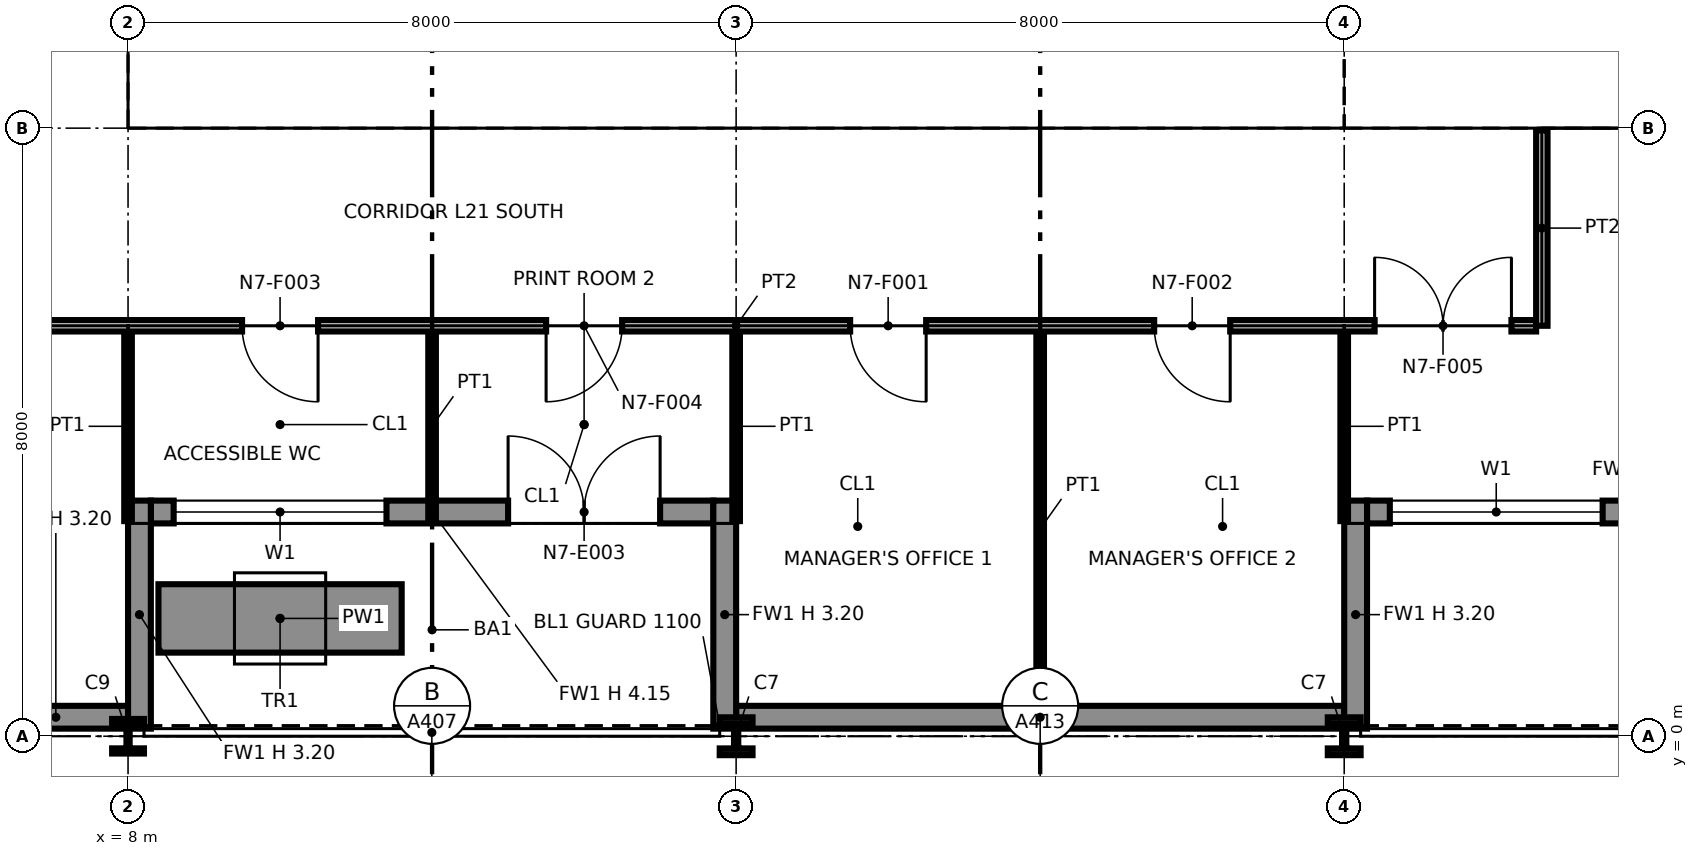
"""IFC4 building model, lengths in metres.
Left out: names, types, materials, properties, quantities, classifications, styles, units other than length and angle.
Written with IfcOpenShell. Run it as: python <this file> out.ifc"""

import sys

from ifc_helpers import new_model, si_unit, direction, frame, frame_2d, origin, origin_2d, place, context, subcontext, project, spatial, polyline, rectangle, i_section, outline, extrude, element, fill, save


model = new_model("IFC4")
c1 = context("Model", 3, precision=1e-05, world=origin(), true_north=direction((0.0, 1.0)))
c2 = subcontext(c1, "Body", "Model", "MODEL_VIEW")
j1 = project(units=[si_unit("LENGTHUNIT", "METRE"), si_unit("PLANEANGLEUNIT", "RADIAN")], contexts=[c1])
p1 = place(None, origin())
s1 = spatial("IfcSite", under=j1, at=p1, CompositionType="ELEMENT")
p2 = place(p1, origin())
s2 = spatial("IfcBuilding", under=s1, at=p2, CompositionType="ELEMENT")
p3 = place(p2, frame((0.0, 0.0, 109.6)))
s3 = spatial("IfcBuildingStorey", under=s2, at=p3, CompositionType="ELEMENT", Elevation=109.6)
p4 = place(p3, frame((8.0, 0.0, 0.0), z_axis=(0.0, 0.0, 1.0), x_axis=(1.0, 0.0, 0.0)))
e1 = element("IfcColumn", 1, at=p4, inside=s3, PredefinedType="COLUMN", context=c2, shape_type="SweptSolid", body=[
    extrude(i_section(OverallWidth=0.419, OverallDepth=0.455, WebThickness=0.042, FlangeThickness=0.068, at=origin_2d()), origin(), (0.0, 0.0, 1.0), 4.15),
])
p5 = place(p3, frame((8.0, 8.0, 0.0), z_axis=(0.0, 0.0, 1.0), x_axis=(1.0, 0.0, 0.0)))
e2 = element("IfcColumn", 2, at=p5, inside=s3, PredefinedType="COLUMN", context=c2, shape_type="SweptSolid", body=[
    extrude(i_section(OverallWidth=0.406, OverallDepth=0.417, WebThickness=0.03, FlangeThickness=0.048, at=origin_2d()), origin(), (0.0, 0.0, 1.0), 4.15),
])
p6 = place(p3, frame((16.0, 0.0, 0.0), z_axis=(0.0, 0.0, 1.0), x_axis=(1.0, 0.0, 0.0)))
e3 = element("IfcColumn", 3, at=p6, inside=s3, PredefinedType="COLUMN", context=c2, shape_type="SweptSolid", body=[
    extrude(i_section(OverallWidth=0.432, OverallDepth=0.498, WebThickness=0.056, FlangeThickness=0.089, at=origin_2d()), origin(), (0.0, 0.0, 1.0), 4.15),
])
p7 = place(p3, frame((16.0, 8.0, 0.0), z_axis=(0.0, 0.0, 1.0), x_axis=(1.0, 0.0, 0.0)))
e4 = element("IfcColumn", 4, at=p7, inside=s3, PredefinedType="COLUMN", context=c2, shape_type="SweptSolid", body=[
    extrude(i_section(OverallWidth=0.406, OverallDepth=0.417, WebThickness=0.03, FlangeThickness=0.048, at=origin_2d()), origin(), (0.0, 0.0, 1.0), 4.15),
])
p8 = place(p3, frame((24.0, 0.0, 0.0), z_axis=(0.0, 0.0, 1.0), x_axis=(1.0, 0.0, 0.0)))
e5 = element("IfcColumn", 5, at=p8, inside=s3, PredefinedType="COLUMN", context=c2, shape_type="SweptSolid", body=[
    extrude(i_section(OverallWidth=0.432, OverallDepth=0.498, WebThickness=0.056, FlangeThickness=0.089, at=origin_2d()), origin(), (0.0, 0.0, 1.0), 4.15),
])
p9 = place(p3, frame((24.0, 8.0, 0.0), z_axis=(0.0, 0.0, 1.0), x_axis=(1.0, 0.0, 0.0)))
e6 = element("IfcColumn", 6, at=p9, inside=s3, PredefinedType="COLUMN", context=c2, shape_type="SweptSolid", body=[
    extrude(i_section(OverallWidth=0.411, OverallDepth=0.434, WebThickness=0.036, FlangeThickness=0.057, at=origin_2d()), origin(), (0.0, 0.0, 1.0), 4.15),
])
p10 = place(p3, frame((6.1, 0.25, 0.0), z_axis=(0.0, 0.0, 1.0), x_axis=(1.0, 0.0, 0.0)))
e7 = element("IfcWall", 7, at=p10, inside=s3, PredefinedType="SOLIDWALL", context=c2, shape_type="SweptSolid", body=[
    extrude(rectangle(XDim=1.9, YDim=0.3, at=frame_2d((0.95, 0.0))), origin(), (0.0, 0.0, 1.0), 3.199),
])
p11 = place(p3, frame((8.3, 2.95, 0.0), z_axis=(0.0, 0.0, 1.0), x_axis=(1.0, 0.0, 0.0)))
e8 = element("IfcWall", 8, at=p11, inside=s3, PredefinedType="SOLIDWALL", context=c2, shape_type="SweptSolid", body=[
    extrude(rectangle(XDim=7.4, YDim=0.3, at=frame_2d((3.7, 0.0))), origin(), (0.0, 0.0, 1.0), 4.15),
])
p12 = place(p11, frame((0.3, 0.0, 0.9)))
e9 = element("IfcOpeningElement", 9, at=p12, cuts=e8, PredefinedType="OPENING", context=c2, shape_type="SweptSolid", body=[
    extrude(rectangle(XDim=2.8, YDim=2.2, at=frame_2d((1.4, 1.1))), frame((0.0, 0.16, 0.0), z_axis=(0.0, -1.0, 0.0), x_axis=(1.0, 0.0, 0.0)), (0.0, 0.0, 1.0), 0.32),
])
p13 = place(p11, frame((4.7, 0.0, 0.0)))
e10 = element("IfcOpeningElement", 10, at=p13, cuts=e8, PredefinedType="OPENING", context=c2, shape_type="SweptSolid", body=[
    extrude(rectangle(XDim=2.0, YDim=2.4, at=frame_2d((1.0, 1.2))), frame((0.0, 0.16, 0.0), z_axis=(0.0, -1.0, 0.0), x_axis=(1.0, 0.0, 0.0)), (0.0, 0.0, 1.0), 0.32),
])
for number, where, z_axis, x_axis in (
    (11, (8.15, 0.1, 0.0), (0.0, 0.0, 1.0), (0.0, 1.0, 0.0)),
    (12, (15.85, 0.1, 0.0), (0.0, 0.0, 1.0), (0.0, 1.0, 0.0)),
):
    element("IfcWall", number, at=place(p3, frame(where, z_axis=z_axis, x_axis=x_axis)), inside=s3, PredefinedType="SOLIDWALL", context=c2, shape_type="SweptSolid", body=[
        extrude(rectangle(XDim=3.0, YDim=0.3, at=frame_2d((1.5, 0.0))), origin(), (0.0, 0.0, 1.0), 3.199),
    ])
p14 = place(p3, frame((16.0, 0.25, 0.0), z_axis=(0.0, 0.0, 1.0), x_axis=(1.0, 0.0, 0.0)))
e13 = element("IfcWall", 13, at=p14, inside=s3, PredefinedType="SOLIDWALL", context=c2, shape_type="SweptSolid", body=[
    extrude(rectangle(XDim=8.0, YDim=0.3, at=frame_2d((4.0, 0.0))), origin(), (0.0, 0.0, 1.0), 3.199),
])
p15 = place(p3, frame((24.3, 2.95, 0.0), z_axis=(0.0, 0.0, 1.0), x_axis=(1.0, 0.0, 0.0)))
e14 = element("IfcWall", 14, at=p15, inside=s3, PredefinedType="SOLIDWALL", context=c2, shape_type="SweptSolid", body=[
    extrude(rectangle(XDim=7.4, YDim=0.3, at=frame_2d((3.7, 0.0))), origin(), (0.0, 0.0, 1.0), 4.15),
])
p16 = place(p15, frame((0.3, 0.0, 0.9)))
e15 = element("IfcOpeningElement", 15, at=p16, cuts=e14, PredefinedType="OPENING", context=c2, shape_type="SweptSolid", body=[
    extrude(rectangle(XDim=2.8, YDim=2.2, at=frame_2d((1.4, 1.1))), frame((0.0, 0.16, 0.0), z_axis=(0.0, -1.0, 0.0), x_axis=(1.0, 0.0, 0.0)), (0.0, 0.0, 1.0), 0.32),
])
p17 = place(p15, frame((4.7, 0.0, 0.0)))
e16 = element("IfcOpeningElement", 16, at=p17, cuts=e14, PredefinedType="OPENING", context=c2, shape_type="SweptSolid", body=[
    extrude(rectangle(XDim=2.0, YDim=2.4, at=frame_2d((1.0, 1.2))), frame((0.0, 0.16, 0.0), z_axis=(0.0, -1.0, 0.0), x_axis=(1.0, 0.0, 0.0)), (0.0, 0.0, 1.0), 0.32),
])
p18 = place(p3, frame((24.15, 0.1, 0.0), z_axis=(0.0, 0.0, 1.0), x_axis=(0.0, 1.0, 0.0)))
e17 = element("IfcWall", 17, at=p18, inside=s3, PredefinedType="SOLIDWALL", context=c2, shape_type="SweptSolid", body=[
    extrude(rectangle(XDim=3.0, YDim=0.3, at=frame_2d((1.5, 0.0))), origin(), (0.0, 0.0, 1.0), 3.199),
])
p19 = place(p3, frame((8.4, 1.55, 0.0), z_axis=(0.0, 0.0, 1.0), x_axis=(1.0, 0.0, 0.0)))
e18 = element("IfcWall", 18, at=p19, inside=s3, PredefinedType="SOLIDWALL", context=c2, shape_type="SweptSolid", body=[
    extrude(rectangle(XDim=3.2, YDim=0.9, at=frame_2d((1.6, 0.0))), origin(), (0.0, 0.0, 1.0), 0.6),
])
p20 = place(p3, frame((8.65, 8.75, 0.0), z_axis=(0.0, 0.0, 1.0), x_axis=(1.0, 0.0, 0.0)))
e19 = element("IfcWall", 19, at=p20, inside=s3, PredefinedType="PARTITIONING", context=c2, shape_type="SweptSolid", body=[
    extrude(outline(polyline([(0.0, 0.0), (14.7, 0.0), (14.7, 4.15), (7.489, 4.15), (7.488, 3.382), (7.212, 3.382), (7.211, 4.15), (0.0, 4.15), (0.0, 0.0)])), frame((0.0, 0.1, 0.0), z_axis=(0.0, -1.0, 0.0), x_axis=(1.0, 0.0, 0.0)), (0.0, 0.0, 1.0), 0.2),
])
p21 = place(p20, frame((1.3, 0.0, 0.0)))
e20 = element("IfcOpeningElement", 20, at=p21, cuts=e19, PredefinedType="OPENING", context=c2, shape_type="SweptSolid", body=[
    extrude(rectangle(XDim=1.4, YDim=2.1, at=frame_2d((0.7, 1.05))), frame((0.0, 0.11, 0.0), z_axis=(0.0, -1.0, 0.0), x_axis=(1.0, 0.0, 0.0)), (0.0, 0.0, 1.0), 0.22),
])
p22 = place(p20, frame((4.6, 0.0, 0.0)))
e21 = element("IfcOpeningElement", 21, at=p22, cuts=e19, PredefinedType="OPENING", context=c2, shape_type="SweptSolid", body=[
    extrude(rectangle(XDim=1.4, YDim=2.1, at=frame_2d((0.7, 1.05))), frame((0.0, 0.11, 0.0), z_axis=(0.0, -1.0, 0.0), x_axis=(1.0, 0.0, 0.0)), (0.0, 0.0, 1.0), 0.22),
])
p23 = place(p20, frame((10.4, 0.0, 0.0)))
e22 = element("IfcOpeningElement", 22, at=p23, cuts=e19, PredefinedType="OPENING", context=c2, shape_type="SweptSolid", body=[
    extrude(rectangle(XDim=1.2, YDim=2.1, at=frame_2d((0.6, 1.05))), frame((0.0, 0.11, 0.0), z_axis=(0.0, -1.0, 0.0), x_axis=(1.0, 0.0, 0.0)), (0.0, 0.0, 1.0), 0.22),
])
p24 = place(p3, frame((8.75, 8.85, 0.0), z_axis=(0.0, 0.0, 1.0), x_axis=(0.0, 1.0, 0.0)))
e23 = element("IfcWall", 23, at=p24, inside=s3, PredefinedType="PARTITIONING", context=c2, shape_type="SweptSolid", body=[
    extrude(outline(polyline([(0.0, 0.0), (14.3, 0.0), (14.3, 4.15), (10.269, 4.15), (10.268, 3.542), (10.032, 3.542), (10.031, 4.15), (7.289, 4.15), (7.288, 3.382), (7.012, 3.382), (7.011, 4.15), (0.0, 4.15), (0.0, 0.0)])), frame((0.0, 0.1, 0.0), z_axis=(0.0, -1.0, 0.0), x_axis=(1.0, 0.0, 0.0)), (0.0, 0.0, 1.0), 0.2),
])
p25 = place(p24, frame((8.3, 0.0, 0.0)))
e24 = element("IfcOpeningElement", 24, at=p25, cuts=e23, PredefinedType="OPENING", context=c2, shape_type="SweptSolid", body=[
    extrude(rectangle(XDim=1.8, YDim=2.1, at=frame_2d((0.9, 1.05))), frame((0.0, 0.11, 0.0), z_axis=(0.0, -1.0, 0.0), x_axis=(1.0, 0.0, 0.0)), (0.0, 0.0, 1.0), 0.22),
])
p26 = place(p3, frame((12.4, 8.85, 0.0), z_axis=(0.0, 0.0, 1.0), x_axis=(0.0, 1.0, 0.0)))
e25 = element("IfcWall", 25, at=p26, inside=s3, PredefinedType="PARTITIONING", context=c2, shape_type="SweptSolid", body=[
    extrude(rectangle(XDim=6.85, YDim=0.2, at=frame_2d((3.425, 0.0))), origin(), (0.0, 0.0, 1.0), 4.15),
])
p27 = place(p3, frame((15.85, 8.85, 0.0), z_axis=(0.0, 0.0, 1.0), x_axis=(0.0, 1.0, 0.0)))
e26 = element("IfcWall", 26, at=p27, inside=s3, PredefinedType="PARTITIONING", context=c2, shape_type="SweptSolid", body=[
    extrude(rectangle(XDim=1.55, YDim=0.9, at=frame_2d((0.775, 0.0))), origin(), (0.0, 0.0, 1.0), 3.382),
])
p28 = place(p27, frame((0.3, 0.0, 0.0)))
e27 = element("IfcOpeningElement", 27, at=p28, cuts=e26, PredefinedType="OPENING", context=c2, shape_type="SweptSolid", body=[
    extrude(rectangle(XDim=1.1, YDim=2.1, at=frame_2d((0.55, 1.05))), frame((0.0, 0.46, 0.0), z_axis=(0.0, -1.0, 0.0), x_axis=(1.0, 0.0, 0.0)), (0.0, 0.0, 1.0), 0.92),
])
p29 = place(p3, frame((23.25, 8.85, 0.0), z_axis=(0.0, 0.0, 1.0), x_axis=(0.0, 1.0, 0.0)))
e28 = element("IfcWall", 28, at=p29, inside=s3, PredefinedType="PARTITIONING", context=c2, shape_type="SweptSolid", body=[
    extrude(outline(polyline([(0.0, 0.0), (14.3, 0.0), (14.3, 4.15), (11.269, 4.15), (11.268, 3.542), (11.032, 3.542), (11.031, 4.15), (7.289, 4.15), (7.288, 3.382), (7.012, 3.382), (7.011, 4.15), (1.269, 4.15), (1.268, 3.542), (1.032, 3.542), (1.031, 4.15), (0.0, 4.15), (0.0, 0.0)])), frame((0.0, 0.1, 0.0), z_axis=(0.0, -1.0, 0.0), x_axis=(1.0, 0.0, 0.0)), (0.0, 0.0, 1.0), 0.2),
])
p30 = place(p29, frame((8.3, 0.0, 0.0)))
e29 = element("IfcOpeningElement", 29, at=p30, cuts=e28, PredefinedType="OPENING", context=c2, shape_type="SweptSolid", body=[
    extrude(rectangle(XDim=1.8, YDim=2.1, at=frame_2d((0.9, 1.05))), frame((0.0, 0.11, 0.0), z_axis=(0.0, -1.0, 0.0), x_axis=(1.0, 0.0, 0.0)), (0.0, 0.0, 1.0), 0.22),
])
p31 = place(p3, frame((24.65, 8.75, 0.0), z_axis=(0.0, 0.0, 1.0), x_axis=(1.0, 0.0, 0.0)))
e30 = element("IfcWall", 30, at=p31, inside=s3, PredefinedType="PARTITIONING", context=c2, shape_type="SweptSolid", body=[
    extrude(outline(polyline([(0.0, 0.0), (14.7, 0.0), (14.7, 4.15), (7.489, 4.15), (7.488, 3.382), (7.212, 3.382), (7.211, 4.15), (0.0, 4.15), (0.0, 0.0)])), frame((0.0, 0.1, 0.0), z_axis=(0.0, -1.0, 0.0), x_axis=(1.0, 0.0, 0.0)), (0.0, 0.0, 1.0), 0.2),
])
p32 = place(p3, frame((24.75, 8.85, 0.0), z_axis=(0.0, 0.0, 1.0), x_axis=(0.0, 1.0, 0.0)))
e31 = element("IfcWall", 31, at=p32, inside=s3, PredefinedType="PARTITIONING", context=c2, shape_type="SweptSolid", body=[
    extrude(outline(polyline([(0.0, 0.0), (6.3, 0.0), (6.3, 4.15), (3.269, 4.15), (3.268, 3.542), (3.032, 3.542), (3.031, 4.15), (0.0, 4.15), (0.0, 0.0)])), frame((0.0, 0.1, 0.0), z_axis=(0.0, -1.0, 0.0), x_axis=(1.0, 0.0, 0.0)), (0.0, 0.0, 1.0), 0.2),
])
p33 = place(p3, frame((27.075, 8.85, 0.0), z_axis=(0.0, 0.0, 1.0), x_axis=(0.0, 1.0, 0.0)))
e32 = element("IfcWall", 32, at=p33, inside=s3, PredefinedType="PARTITIONING", context=c2, shape_type="SweptSolid", body=[
    extrude(rectangle(XDim=3.0, YDim=0.15, at=frame_2d((1.5, 0.0))), origin(), (0.0, 0.0, 1.0), 4.15),
])
p34 = place(p3, frame((20.0, 0.13, 0.0), z_axis=(0.0, 0.0, 1.0), x_axis=(0.0, 1.0, 0.0)))
e33 = element("IfcWall", 33, at=p34, inside=s3, PredefinedType="PARTITIONING", context=c2, shape_type="SweptSolid", body=[
    extrude(rectangle(XDim=5.195, YDim=0.1, at=frame_2d((2.598, 0.0))), origin(), (0.0, 0.0, 1.0), 3.194),
])
for number, where, z_axis, x_axis in (
    (34, (8.0, 2.83, 0.0), (0.0, 0.0, 1.0), (0.0, 1.0, 0.0)),
    (35, (12.0, 2.83, 0.0), (0.0, 0.0, 1.0), (0.0, 1.0, 0.0)),
    (36, (16.0, 2.83, 0.0), (0.0, 0.0, 1.0), (0.0, 1.0, 0.0)),
    (37, (24.0, 2.83, 0.0), (0.0, 0.0, 1.0), (0.0, 1.0, 0.0)),
):
    element("IfcWall", number, at=place(p3, frame(where, z_axis=z_axis, x_axis=x_axis)), inside=s3, PredefinedType="PARTITIONING", context=c2, shape_type="SweptSolid", body=[
        extrude(rectangle(XDim=2.495, YDim=0.1, at=frame_2d((1.248, 0.0))), origin(), (0.0, 0.0, 1.0), 3.194),
    ])
p35 = place(p3, frame((5.475, 5.4, 0.0), z_axis=(0.0, 0.0, 1.0), x_axis=(1.0, 0.0, 0.0)))
e38 = element("IfcWall", 38, at=p35, inside=s3, PredefinedType="PARTITIONING", context=c2, shape_type="SweptSolid", body=[
    extrude(rectangle(XDim=21.05, YDim=0.15, at=frame_2d((10.525, 0.0))), origin(), (0.0, 0.0, 1.0), 3.194),
])
p36 = place(p35, frame((13.025, 0.0, 0.0), z_axis=(0.0, 0.0, 1.0), x_axis=(-1.0, 0.0, 0.0)))
e39 = element("IfcOpeningElement", 39, at=p36, cuts=e38, PredefinedType="OPENING", context=c2, shape_type="SweptSolid", body=[
    extrude(rectangle(XDim=1.0, YDim=2.1, at=frame_2d((0.5, 1.05))), frame((0.0, 0.085, 0.0), z_axis=(0.0, -1.0, 0.0), x_axis=(1.0, 0.0, 0.0)), (0.0, 0.0, 1.0), 0.17),
])
p37 = place(p35, frame((17.025, 0.0, 0.0), z_axis=(0.0, 0.0, 1.0), x_axis=(-1.0, 0.0, 0.0)))
e40 = element("IfcOpeningElement", 40, at=p37, cuts=e38, PredefinedType="OPENING", context=c2, shape_type="SweptSolid", body=[
    extrude(rectangle(XDim=1.0, YDim=2.1, at=frame_2d((0.5, 1.05))), frame((0.0, 0.085, 0.0), z_axis=(0.0, -1.0, 0.0), x_axis=(1.0, 0.0, 0.0)), (0.0, 0.0, 1.0), 0.17),
])
p38 = place(p35, frame((5.025, 0.0, 0.0), z_axis=(0.0, 0.0, 1.0), x_axis=(-1.0, 0.0, 0.0)))
e41 = element("IfcOpeningElement", 41, at=p38, cuts=e38, PredefinedType="OPENING", context=c2, shape_type="SweptSolid", body=[
    extrude(rectangle(XDim=1.0, YDim=2.1, at=frame_2d((0.5, 1.05))), frame((0.0, 0.085, 0.0), z_axis=(0.0, -1.0, 0.0), x_axis=(1.0, 0.0, 0.0)), (0.0, 0.0, 1.0), 0.17),
])
p39 = place(p35, frame((9.025, 0.0, 0.0), z_axis=(0.0, 0.0, 1.0), x_axis=(-1.0, 0.0, 0.0)))
e42 = element("IfcOpeningElement", 42, at=p39, cuts=e38, PredefinedType="OPENING", context=c2, shape_type="SweptSolid", body=[
    extrude(rectangle(XDim=1.0, YDim=2.1, at=frame_2d((0.5, 1.05))), frame((0.0, 0.085, 0.0), z_axis=(0.0, -1.0, 0.0), x_axis=(1.0, 0.0, 0.0)), (0.0, 0.0, 1.0), 0.17),
])
p40 = place(p35, frame((18.925, 0.0, 0.0)))
e43 = element("IfcOpeningElement", 43, at=p40, cuts=e38, PredefinedType="OPENING", context=c2, shape_type="SweptSolid", body=[
    extrude(rectangle(XDim=1.8, YDim=2.1, at=frame_2d((0.9, 1.05))), frame((0.0, 0.085, 0.0), z_axis=(0.0, -1.0, 0.0), x_axis=(1.0, 0.0, 0.0)), (0.0, 0.0, 1.0), 0.17),
])
p41 = place(p3, frame((26.6, 5.4, 0.0), z_axis=(0.0, 0.0, 1.0), x_axis=(0.0, 1.0, 0.0)))
e44 = element("IfcWall", 44, at=p41, inside=s3, PredefinedType="PARTITIONING", context=c2, shape_type="SweptSolid", body=[
    extrude(rectangle(XDim=2.57, YDim=0.15, at=frame_2d((1.285, 0.0))), origin(), (0.0, 0.0, 1.0), 3.194),
])
p42 = place(p12, origin())
e45 = element("IfcWindow", 45, at=p42, inside=s3, PartitioningType="SINGLE_PANEL", PredefinedType="WINDOW", context=c2, shape_type="SweptSolid", body=[
    extrude(rectangle(XDim=2.8, YDim=2.2, at=frame_2d((1.4, 1.1))), frame((0.0, 0.03, 0.0), z_axis=(0.0, -1.0, 0.0), x_axis=(1.0, 0.0, 0.0)), (0.0, 0.0, 1.0), 0.06),
])
fill(e9, e45)
p43 = place(p13, origin())
e46 = element("IfcDoor", 46, at=p43, inside=s3, OperationType="DOUBLE_DOOR_SINGLE_SWING", PredefinedType="DOOR", context=c2, shape_type="SweptSolid", body=[
    extrude(rectangle(XDim=2.0, YDim=2.4, at=frame_2d((1.0, 1.2))), frame((0.0, 0.025, 0.0), z_axis=(0.0, -1.0, 0.0), x_axis=(1.0, 0.0, 0.0)), (0.0, 0.0, 1.0), 0.05),
])
fill(e10, e46)
p44 = place(p16, origin())
e47 = element("IfcWindow", 47, at=p44, inside=s3, PartitioningType="SINGLE_PANEL", PredefinedType="WINDOW", context=c2, shape_type="SweptSolid", body=[
    extrude(rectangle(XDim=2.8, YDim=2.2, at=frame_2d((1.4, 1.1))), frame((0.0, 0.03, 0.0), z_axis=(0.0, -1.0, 0.0), x_axis=(1.0, 0.0, 0.0)), (0.0, 0.0, 1.0), 0.06),
])
fill(e15, e47)
p45 = place(p21, origin())
e48 = element("IfcDoor", 48, at=p45, inside=s3, OperationType="DOUBLE_DOOR_SINGLE_SWING", PredefinedType="NOTDEFINED", context=c2, shape_type="SweptSolid", body=[
    extrude(rectangle(XDim=1.4, YDim=2.1, at=frame_2d((0.7, 1.05))), frame((0.0, 0.025, 0.0), z_axis=(0.0, -1.0, 0.0), x_axis=(1.0, 0.0, 0.0)), (0.0, 0.0, 1.0), 0.05),
])
fill(e20, e48)
p46 = place(p22, origin())
e49 = element("IfcDoor", 49, at=p46, inside=s3, OperationType="DOUBLE_DOOR_SINGLE_SWING", PredefinedType="NOTDEFINED", context=c2, shape_type="SweptSolid", body=[
    extrude(rectangle(XDim=1.4, YDim=2.1, at=frame_2d((0.7, 1.05))), frame((0.0, 0.025, 0.0), z_axis=(0.0, -1.0, 0.0), x_axis=(1.0, 0.0, 0.0)), (0.0, 0.0, 1.0), 0.05),
])
fill(e21, e49)
p47 = place(p23, origin())
e50 = element("IfcDoor", 50, at=p47, inside=s3, OperationType="SINGLE_SWING_RIGHT", PredefinedType="NOTDEFINED", context=c2, shape_type="SweptSolid", body=[
    extrude(rectangle(XDim=1.2, YDim=2.1, at=frame_2d((0.6, 1.05))), frame((0.0, 0.025, 0.0), z_axis=(0.0, -1.0, 0.0), x_axis=(1.0, 0.0, 0.0)), (0.0, 0.0, 1.0), 0.05),
])
fill(e22, e50)
p48 = place(p36, origin())
e51 = element("IfcDoor", 51, at=p48, inside=s3, OperationType="SINGLE_SWING_LEFT", PredefinedType="DOOR", context=c2, shape_type="SweptSolid", body=[
    extrude(rectangle(XDim=1.0, YDim=2.1, at=frame_2d((0.5, 1.05))), frame((0.0, 0.025, 0.0), z_axis=(0.0, -1.0, 0.0), x_axis=(1.0, 0.0, 0.0)), (0.0, 0.0, 1.0), 0.05),
])
fill(e39, e51)
p49 = place(p37, origin())
e52 = element("IfcDoor", 52, at=p49, inside=s3, OperationType="SINGLE_SWING_LEFT", PredefinedType="DOOR", context=c2, shape_type="SweptSolid", body=[
    extrude(rectangle(XDim=1.0, YDim=2.1, at=frame_2d((0.5, 1.05))), frame((0.0, 0.025, 0.0), z_axis=(0.0, -1.0, 0.0), x_axis=(1.0, 0.0, 0.0)), (0.0, 0.0, 1.0), 0.05),
])
fill(e40, e52)
p50 = place(p38, origin())
e53 = element("IfcDoor", 53, at=p50, inside=s3, OperationType="SINGLE_SWING_LEFT", PredefinedType="DOOR", context=c2, shape_type="SweptSolid", body=[
    extrude(rectangle(XDim=1.0, YDim=2.1, at=frame_2d((0.5, 1.05))), frame((0.0, 0.025, 0.0), z_axis=(0.0, -1.0, 0.0), x_axis=(1.0, 0.0, 0.0)), (0.0, 0.0, 1.0), 0.05),
])
fill(e41, e53)
p51 = place(p39, origin())
e54 = element("IfcDoor", 54, at=p51, inside=s3, OperationType="SINGLE_SWING_RIGHT", PredefinedType="DOOR", context=c2, shape_type="SweptSolid", body=[
    extrude(rectangle(XDim=1.0, YDim=2.1, at=frame_2d((0.5, 1.05))), frame((0.0, 0.025, 0.0), z_axis=(0.0, -1.0, 0.0), x_axis=(1.0, 0.0, 0.0)), (0.0, 0.0, 1.0), 0.05),
])
fill(e42, e54)
p52 = place(p40, origin())
e55 = element("IfcDoor", 55, at=p52, inside=s3, OperationType="DOUBLE_DOOR_SINGLE_SWING", PredefinedType="DOOR", context=c2, shape_type="SweptSolid", body=[
    extrude(rectangle(XDim=1.8, YDim=2.1, at=frame_2d((0.9, 1.05))), frame((0.0, 0.025, 0.0), z_axis=(0.0, -1.0, 0.0), x_axis=(1.0, 0.0, 0.0)), (0.0, 0.0, 1.0), 0.05),
])
fill(e43, e55)
save(model, sys.argv[1])
